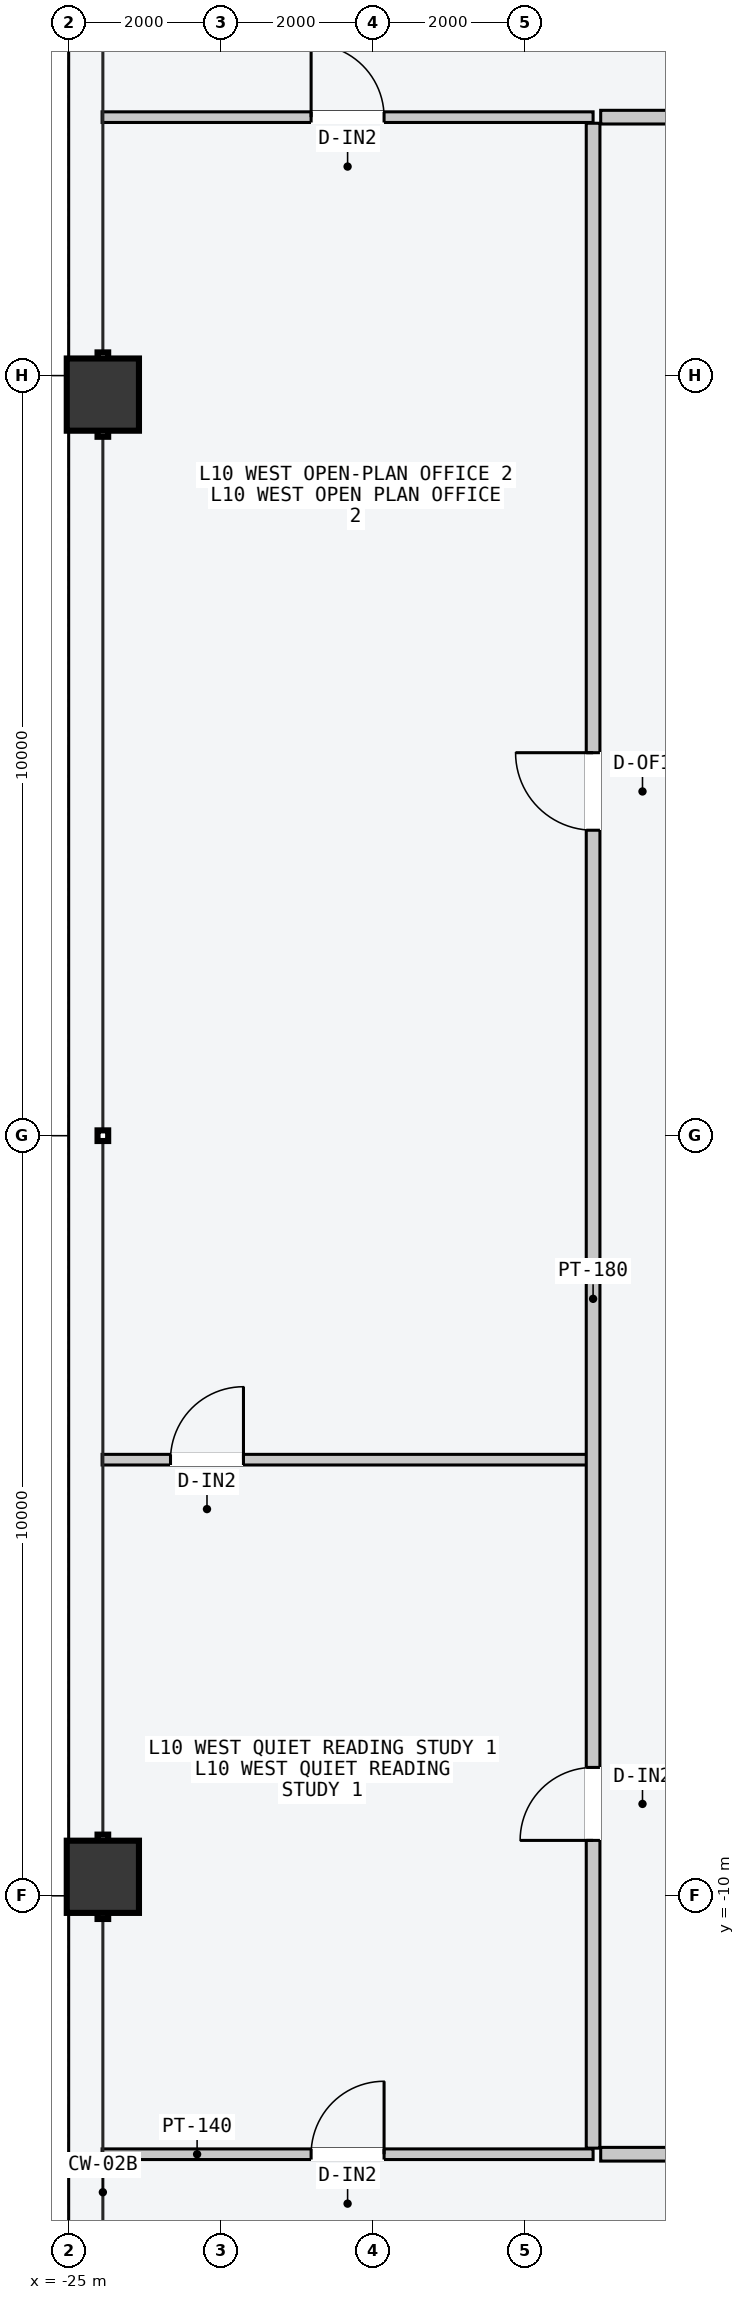
"""IFC4 building model, lengths in metres.
Left out: names, types, materials, properties, quantities, classifications, styles, units other than length and angle.
Written with IfcOpenShell. Run it as: python <this file> out.ifc"""

import sys

from ifc_helpers import new_model, si_unit, direction, frame, frame_2d, origin, origin_2d, place, context, subcontext, project, spatial, rectangle, hollow_rectangle, extrude, element, fill, save


model = new_model("IFC4")
c1 = context("Model", 3, precision=1e-05, world=origin(), true_north=direction((0.0, 1.0)))
c2 = subcontext(c1, "Body", "Model", "MODEL_VIEW")
j1 = project(units=[si_unit("LENGTHUNIT", "METRE"), si_unit("PLANEANGLEUNIT", "RADIAN")], contexts=[c1])
p1 = place(None, origin())
s1 = spatial("IfcSite", under=j1, at=p1, CompositionType="ELEMENT")
p2 = place(p1, origin())
s2 = spatial("IfcBuilding", under=s1, at=p2, CompositionType="ELEMENT")
p3 = place(p2, frame((0.0, 0.0, 42.0)))
s3 = spatial("IfcBuildingStorey", under=s2, at=p3, CompositionType="ELEMENT", Elevation=42.0)
for number, where, z_axis, x_axis in (
    (1, (-24.55, -9.75, 0.0), (0.0, 0.0, 1.0), (0.0, 1.0, 0.0)),
    (2, (-24.55, 9.75, 0.0), (0.0, 0.0, 1.0), (0.0, 1.0, 0.0)),
):
    element("IfcColumn", number, at=place(p3, frame(where, z_axis=z_axis, x_axis=x_axis)), inside=s3, PredefinedType="COLUMN", context=c2, shape_type="SweptSolid", body=[
        extrude(hollow_rectangle(XDim=0.95, YDim=0.95, WallThickness=0.048, at=origin_2d()), origin(), (0.0, 0.0, 1.0), 3.6),
    ])
p4 = place(p3, frame((-18.0, 13.4, 0.0), z_axis=(0.0, 0.0, 1.0), x_axis=(1.0, 0.0, 0.0)))
e3 = element("IfcWall", 3, at=p4, inside=s3, PredefinedType="PARTITIONING", context=c2, shape_type="SweptSolid", body=[
    extrude(rectangle(XDim=36.0, YDim=0.18, at=frame_2d((18.0, 0.0))), origin(), (0.0, 0.0, 1.0), 3.4),
])
p5 = place(p4, frame((7.355, 0.0, 0.0)))
e4 = element("IfcOpeningElement", 4, at=p5, cuts=e3, PredefinedType="OPENING", context=c2, shape_type="SweptSolid", body=[
    extrude(rectangle(XDim=0.9, YDim=2.15, at=frame_2d((0.45, 1.075))), frame((0.0, 0.1, 0.0), z_axis=(0.0, -1.0, 0.0), x_axis=(1.0, 0.0, 0.0)), (0.0, 0.0, 1.0), 0.2),
])
p6 = place(p4, frame((21.303, 0.0, 0.0)))
e5 = element("IfcOpeningElement", 5, at=p6, cuts=e3, PredefinedType="OPENING", context=c2, shape_type="SweptSolid", body=[
    extrude(rectangle(XDim=0.96, YDim=2.18, at=frame_2d((0.48, 1.09))), frame((0.0, 0.1, 0.0), z_axis=(0.0, -1.0, 0.0), x_axis=(1.0, 0.0, 0.0)), (0.0, 0.0, 1.0), 0.2),
])
p7 = place(p4, frame((31.468, 0.0, 0.0)))
e6 = element("IfcOpeningElement", 6, at=p7, cuts=e3, PredefinedType="OPENING", context=c2, shape_type="SweptSolid", body=[
    extrude(rectangle(XDim=1.02, YDim=2.2, at=frame_2d((0.51, 1.1))), frame((0.0, 0.1, 0.0), z_axis=(0.0, -1.0, 0.0), x_axis=(1.0, 0.0, 0.0)), (0.0, 0.0, 1.0), 0.2),
])
p8 = place(p3, frame((-24.56, 13.4, 0.0), z_axis=(0.0, 0.0, 1.0), x_axis=(1.0, 0.0, 0.0)))
e7 = element("IfcWall", 7, at=p8, inside=s3, PredefinedType="PARTITIONING", context=c2, shape_type="SweptSolid", body=[
    extrude(rectangle(XDim=6.46, YDim=0.14, at=frame_2d((3.23, 0.0))), origin(), (0.0, 0.0, 1.0), 3.4),
])
p9 = place(p8, frame((2.75, 0.0, 0.0)))
e8 = element("IfcOpeningElement", 8, at=p9, cuts=e7, PredefinedType="OPENING", context=c2, shape_type="SweptSolid", body=[
    extrude(rectangle(XDim=0.96, YDim=2.18, at=frame_2d((0.48, 1.09))), frame((0.0, 0.08, 0.0), z_axis=(0.0, -1.0, 0.0), x_axis=(1.0, 0.0, 0.0)), (0.0, 0.0, 1.0), 0.16),
])
p10 = place(p3, frame((-18.0, -13.4, 0.0), z_axis=(0.0, 0.0, 1.0), x_axis=(1.0, 0.0, 0.0)))
e9 = element("IfcWall", 9, at=p10, inside=s3, PredefinedType="PARTITIONING", context=c2, shape_type="SweptSolid", body=[
    extrude(rectangle(XDim=36.0, YDim=0.18, at=frame_2d((18.0, 0.0))), origin(), (0.0, 0.0, 1.0), 3.4),
])
p11 = place(p10, frame((7.205, 0.0, 0.0)))
e10 = element("IfcOpeningElement", 10, at=p11, cuts=e9, PredefinedType="OPENING", context=c2, shape_type="SweptSolid", body=[
    extrude(rectangle(XDim=1.06, YDim=2.2, at=frame_2d((0.53, 1.1))), frame((0.0, 0.1, 0.0), z_axis=(0.0, -1.0, 0.0), x_axis=(1.0, 0.0, 0.0)), (0.0, 0.0, 1.0), 0.2),
])
p12 = place(p10, frame((25.115, 0.0, 0.0)))
e11 = element("IfcOpeningElement", 11, at=p12, cuts=e9, PredefinedType="OPENING", context=c2, shape_type="SweptSolid", body=[
    extrude(rectangle(XDim=1.24, YDim=2.24, at=frame_2d((0.62, 1.12))), frame((0.0, 0.1, 0.0), z_axis=(0.0, -1.0, 0.0), x_axis=(1.0, 0.0, 0.0)), (0.0, 0.0, 1.0), 0.2),
])
p13 = place(p3, frame((-24.56, -13.4, 0.0), z_axis=(0.0, 0.0, 1.0), x_axis=(1.0, 0.0, 0.0)))
e12 = element("IfcWall", 12, at=p13, inside=s3, PredefinedType="PARTITIONING", context=c2, shape_type="SweptSolid", body=[
    extrude(rectangle(XDim=6.46, YDim=0.14, at=frame_2d((3.23, 0.0))), origin(), (0.0, 0.0, 1.0), 3.4),
])
p14 = place(p13, frame((2.75, 0.0, 0.0)))
e13 = element("IfcOpeningElement", 13, at=p14, cuts=e12, PredefinedType="OPENING", context=c2, shape_type="SweptSolid", body=[
    extrude(rectangle(XDim=0.96, YDim=2.18, at=frame_2d((0.48, 1.09))), frame((0.0, 0.08, 0.0), z_axis=(0.0, -1.0, 0.0), x_axis=(1.0, 0.0, 0.0)), (0.0, 0.0, 1.0), 0.16),
])
p15 = place(p3, frame((-24.56, -4.262, 0.0), z_axis=(0.0, 0.0, 1.0), x_axis=(1.0, 0.0, 0.0)))
e14 = element("IfcWall", 14, at=p15, inside=s3, PredefinedType="PARTITIONING", context=c2, shape_type="SweptSolid", body=[
    extrude(rectangle(XDim=6.4, YDim=0.14, at=frame_2d((3.2, 0.0))), origin(), (0.0, 0.0, 1.0), 3.4),
])
p16 = place(p15, frame((0.9, 0.0, 0.0)))
e15 = element("IfcOpeningElement", 15, at=p16, cuts=e14, PredefinedType="OPENING", context=c2, shape_type="SweptSolid", body=[
    extrude(rectangle(XDim=0.96, YDim=2.18, at=frame_2d((0.48, 1.09))), frame((0.0, 0.08, 0.0), z_axis=(0.0, -1.0, 0.0), x_axis=(1.0, 0.0, 0.0)), (0.0, 0.0, 1.0), 0.16),
])
p17 = place(p3, frame((-18.1, -13.32, 0.0), z_axis=(0.0, 0.0, 1.0), x_axis=(0.0, 1.0, 0.0)))
e16 = element("IfcWall", 16, at=p17, inside=s3, PredefinedType="PARTITIONING", context=c2, shape_type="SweptSolid", body=[
    extrude(rectangle(XDim=26.64, YDim=0.18, at=frame_2d((13.32, 0.0))), origin(), (0.0, 0.0, 1.0), 3.4),
])
p18 = place(p17, frame((4.049, 0.0, 0.0)))
e17 = element("IfcOpeningElement", 17, at=p18, cuts=e16, PredefinedType="OPENING", context=c2, shape_type="SweptSolid", body=[
    extrude(rectangle(XDim=0.96, YDim=2.18, at=frame_2d((0.48, 1.09))), frame((0.0, 0.1, 0.0), z_axis=(0.0, -1.0, 0.0), x_axis=(1.0, 0.0, 0.0)), (0.0, 0.0, 1.0), 0.2),
])
p19 = place(p17, frame((17.339, 0.0, 0.0)))
e18 = element("IfcOpeningElement", 18, at=p19, cuts=e16, PredefinedType="OPENING", context=c2, shape_type="SweptSolid", body=[
    extrude(rectangle(XDim=1.02, YDim=2.2, at=frame_2d((0.51, 1.1))), frame((0.0, 0.1, 0.0), z_axis=(0.0, -1.0, 0.0), x_axis=(1.0, 0.0, 0.0)), (0.0, 0.0, 1.0), 0.2),
])
p20 = place(p9, origin())
e19 = element("IfcDoor", 19, at=p20, inside=s3, OperationType="SINGLE_SWING_LEFT", PredefinedType="DOOR", context=c2, shape_type="SweptSolid", body=[
    extrude(rectangle(XDim=0.96, YDim=2.18, at=frame_2d((0.48, 1.09))), frame((0.0, 0.025, 0.0), z_axis=(0.0, -1.0, 0.0), x_axis=(1.0, 0.0, 0.0)), (0.0, 0.0, 1.0), 0.05),
])
fill(e8, e19)
p21 = place(p14, origin())
e20 = element("IfcDoor", 20, at=p21, inside=s3, OperationType="SINGLE_SWING_RIGHT", PredefinedType="DOOR", context=c2, shape_type="SweptSolid", body=[
    extrude(rectangle(XDim=0.96, YDim=2.18, at=frame_2d((0.48, 1.09))), frame((0.0, 0.025, 0.0), z_axis=(0.0, -1.0, 0.0), x_axis=(1.0, 0.0, 0.0)), (0.0, 0.0, 1.0), 0.05),
])
fill(e13, e20)
p22 = place(p16, origin())
e21 = element("IfcDoor", 21, at=p22, inside=s3, OperationType="SINGLE_SWING_RIGHT", PredefinedType="DOOR", context=c2, shape_type="SweptSolid", body=[
    extrude(rectangle(XDim=0.96, YDim=2.18, at=frame_2d((0.48, 1.09))), frame((0.0, 0.025, 0.0), z_axis=(0.0, -1.0, 0.0), x_axis=(1.0, 0.0, 0.0)), (0.0, 0.0, 1.0), 0.05),
])
fill(e15, e21)
p23 = place(p18, origin())
e22 = element("IfcDoor", 22, at=p23, inside=s3, OperationType="SINGLE_SWING_LEFT", PredefinedType="DOOR", context=c2, shape_type="SweptSolid", body=[
    extrude(rectangle(XDim=0.96, YDim=2.18, at=frame_2d((0.48, 1.09))), frame((0.0, 0.025, 0.0), z_axis=(0.0, -1.0, 0.0), x_axis=(1.0, 0.0, 0.0)), (0.0, 0.0, 1.0), 0.05),
])
fill(e17, e22)
p24 = place(p19, origin())
e23 = element("IfcDoor", 23, at=p24, inside=s3, OperationType="SINGLE_SWING_RIGHT", PredefinedType="DOOR", context=c2, shape_type="SweptSolid", body=[
    extrude(rectangle(XDim=1.02, YDim=2.2, at=frame_2d((0.51, 1.1))), frame((0.0, 0.025, 0.0), z_axis=(0.0, -1.0, 0.0), x_axis=(1.0, 0.0, 0.0)), (0.0, 0.0, 1.0), 0.05),
])
fill(e18, e23)
save(model, sys.argv[1])
